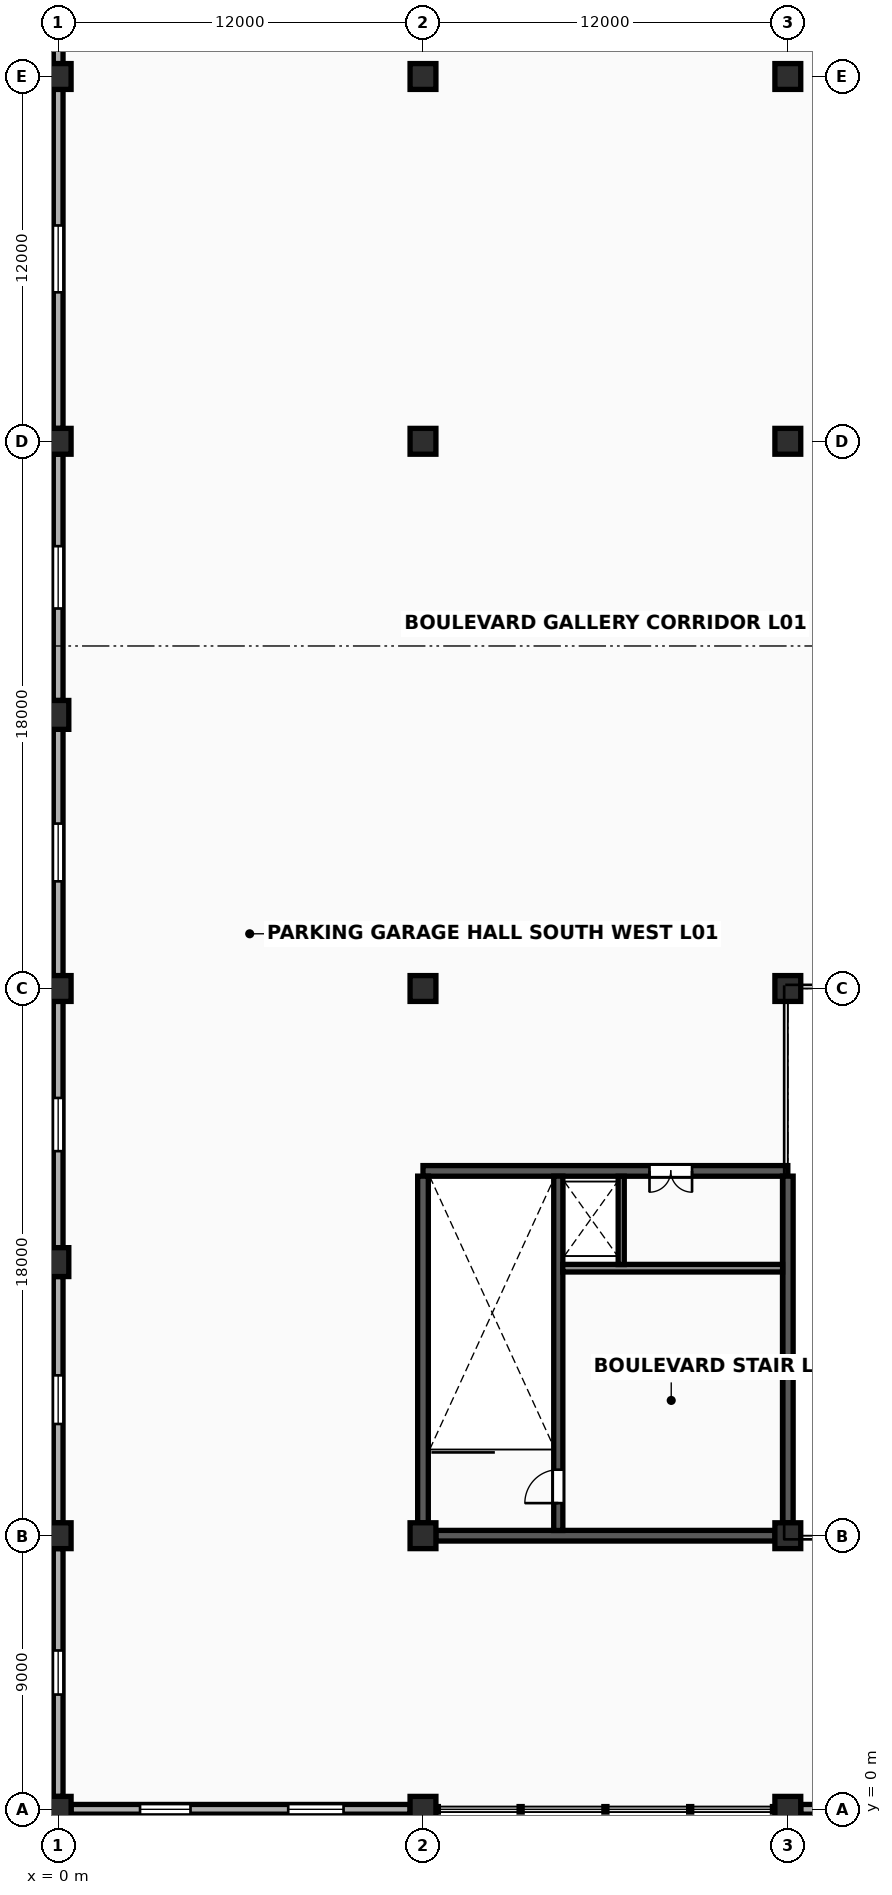
"""IFC4 building model, lengths in metres.
Left out: names, types, materials, properties, quantities, classifications, styles, units other than length and angle.
Written with IfcOpenShell. Run it as: python <this file> out.ifc"""

import sys

from ifc_helpers import new_model, si_unit, direction, frame, frame_2d, origin, origin_2d, place, context, subcontext, project, spatial, rectangle, circle, extrude, element, fill, save


model = new_model("IFC4")
c1 = context("Model", 3, precision=1e-05, world=origin(), true_north=direction((0.0, 1.0)))
c2 = subcontext(c1, "Body", "Model", "MODEL_VIEW")
j1 = project(units=[si_unit("LENGTHUNIT", "METRE"), si_unit("PLANEANGLEUNIT", "RADIAN")], contexts=[c1])
p1 = place(None, origin())
s1 = spatial("IfcSite", under=j1, at=p1, CompositionType="ELEMENT")
p2 = place(p1, origin())
s2 = spatial("IfcBuilding", under=s1, at=p2, CompositionType="ELEMENT")
p3 = place(p2, frame((0.0, 0.0, 5.4)))
s3 = spatial("IfcBuildingStorey", under=s2, at=p3, CompositionType="ELEMENT", Elevation=5.4)
for number, where, z_axis, x_axis in (
    (1, (0.0, 0.0, 0.0), (0.0, 0.0, 1.0), (1.0, 0.0, 0.0)),
    (2, (0.0, 9.0, 0.0), (0.0, 0.0, 1.0), (1.0, 0.0, 0.0)),
    (3, (0.0, 27.0, 0.0), (0.0, 0.0, 1.0), (1.0, 0.0, 0.0)),
    (4, (0.0, 45.0, 0.0), (0.0, 0.0, 1.0), (1.0, 0.0, 0.0)),
    (5, (0.0, 57.0, 0.0), (0.0, 0.0, 1.0), (1.0, 0.0, 0.0)),
):
    element("IfcColumn", number, at=place(p3, frame(where, z_axis=z_axis, x_axis=x_axis)), inside=s3, PredefinedType="COLUMN", context=c2, shape_type="SweptSolid", body=[
        extrude(rectangle(XDim=0.85, YDim=0.85, at=origin_2d()), origin(), (0.0, 0.0, 1.0), 4.2),
    ])
p4 = place(p3, frame((12.0, 0.0, 0.0), z_axis=(0.0, 0.0, 1.0), x_axis=(1.0, 0.0, 0.0)))
e6 = element("IfcColumn", 6, at=p4, inside=s3, PredefinedType="COLUMN", context=c2, shape_type="SweptSolid", body=[
    extrude(circle(Radius=0.425, at=origin_2d()), origin(), (0.0, 0.0, 1.0), 4.2),
])
for number, where, z_axis, x_axis in (
    (7, (12.0, 9.0, 0.0), (0.0, 0.0, 1.0), (1.0, 0.0, 0.0)),
    (8, (12.0, 27.0, 0.0), (0.0, 0.0, 1.0), (1.0, 0.0, 0.0)),
    (9, (12.0, 45.0, 0.0), (0.0, 0.0, 1.0), (1.0, 0.0, 0.0)),
    (10, (12.0, 57.0, 0.0), (0.0, 0.0, 1.0), (1.0, 0.0, 0.0)),
):
    element("IfcColumn", number, at=place(p3, frame(where, z_axis=z_axis, x_axis=x_axis)), inside=s3, PredefinedType="COLUMN", context=c2, shape_type="SweptSolid", body=[
        extrude(rectangle(XDim=0.85, YDim=0.85, at=origin_2d()), origin(), (0.0, 0.0, 1.0), 4.2),
    ])
p5 = place(p3, frame((24.0, 0.0, 0.0), z_axis=(0.0, 0.0, 1.0), x_axis=(1.0, 0.0, 0.0)))
e11 = element("IfcColumn", 11, at=p5, inside=s3, PredefinedType="COLUMN", context=c2, shape_type="SweptSolid", body=[
    extrude(circle(Radius=0.425, at=origin_2d()), origin(), (0.0, 0.0, 1.0), 4.2),
])
for number, where, z_axis, x_axis in (
    (12, (24.0, 9.0, 0.0), (0.0, 0.0, 1.0), (1.0, 0.0, 0.0)),
    (13, (24.0, 27.0, 0.0), (0.0, 0.0, 1.0), (1.0, 0.0, 0.0)),
    (14, (24.0, 45.0, 0.0), (0.0, 0.0, 1.0), (1.0, 0.0, 0.0)),
    (15, (24.0, 57.0, 0.0), (0.0, 0.0, 1.0), (1.0, 0.0, 0.0)),
):
    element("IfcColumn", number, at=place(p3, frame(where, z_axis=z_axis, x_axis=x_axis)), inside=s3, PredefinedType="COLUMN", context=c2, shape_type="SweptSolid", body=[
        extrude(rectangle(XDim=0.85, YDim=0.85, at=origin_2d()), origin(), (0.0, 0.0, 1.0), 4.2),
    ])
for number, where, z_axis, x_axis in (
    (16, (0.0, 18.0, 0.0), (0.0, 0.0, 1.0), (1.0, 0.0, 0.0)),
    (17, (0.0, 36.0, 0.0), (0.0, 0.0, 1.0), (1.0, 0.0, 0.0)),
):
    element("IfcColumn", number, at=place(p3, frame(where, z_axis=z_axis, x_axis=x_axis)), inside=s3, PredefinedType="PILASTER", context=c2, shape_type="SweptSolid", body=[
        extrude(rectangle(XDim=0.7, YDim=0.95, at=origin_2d()), origin(), (0.0, 0.0, 1.0), 4.2),
    ])
p6 = place(p3, frame((12.422, 9.0, 0.0), z_axis=(0.0, 0.0, 1.0), x_axis=(1.0, 0.0, 0.0)))
e18 = element("IfcWall", 18, at=p6, inside=s3, PredefinedType="SHEAR", context=c2, shape_type="SweptSolid", body=[
    extrude(rectangle(XDim=11.156, YDim=0.35, at=frame_2d((5.578, 0.0))), origin(), (0.0, 0.0, 1.0), 4.043),
])
p7 = place(p3, frame((12.0, 21.0, 0.0), z_axis=(0.0, 0.0, 1.0), x_axis=(1.0, 0.0, 0.0)))
e19 = element("IfcWall", 19, at=p7, inside=s3, PredefinedType="SHEAR", context=c2, shape_type="SweptSolid", body=[
    extrude(rectangle(XDim=12.0, YDim=0.35, at=frame_2d((6.0, 0.0))), origin(), (0.0, 0.0, 1.0), 4.043),
])
p8 = place(p7, frame((7.45, 0.0, 0.0)))
e20 = element("IfcOpeningElement", 20, at=p8, cuts=e19, PredefinedType="OPENING", context=c2, shape_type="SweptSolid", body=[
    extrude(rectangle(XDim=1.4, YDim=2.22, at=frame_2d((0.7, 1.11))), frame((0.0, 0.19, 0.0), z_axis=(0.0, -1.0, 0.0), x_axis=(1.0, 0.0, 0.0)), (0.0, 0.0, 1.0), 0.38),
])
for number, where, z_axis, x_axis in (
    (21, (12.0, 9.422, 0.0), (0.0, 0.0, 1.0), (0.0, 1.0, 0.0)),
    (22, (24.0, 9.422, 0.0), (0.0, 0.0, 1.0), (0.0, 1.0, 0.0)),
):
    element("IfcWall", number, at=place(p3, frame(where, z_axis=z_axis, x_axis=x_axis)), inside=s3, PredefinedType="SHEAR", context=c2, shape_type="SweptSolid", body=[
        extrude(rectangle(XDim=11.406, YDim=0.35, at=frame_2d((5.703, 0.0))), origin(), (0.0, 0.0, 1.0), 4.043),
    ])
p9 = place(p3, frame((16.45, 9.172, 0.0), z_axis=(0.0, 0.0, 1.0), x_axis=(0.0, 1.0, 0.0)))
e23 = element("IfcWall", 23, at=p9, inside=s3, PredefinedType="SHEAR", context=c2, shape_type="SweptSolid", body=[
    extrude(rectangle(XDim=11.656, YDim=0.3, at=frame_2d((5.828, 0.0))), origin(), (0.0, 0.0, 1.0), 4.043),
])
p10 = place(p9, frame((0.9, 0.0, 0.0)))
e24 = element("IfcOpeningElement", 24, at=p10, cuts=e23, PredefinedType="OPENING", context=c2, shape_type="SweptSolid", body=[
    extrude(rectangle(XDim=1.1, YDim=2.2, at=frame_2d((0.55, 1.1))), frame((0.0, 0.165, 0.0), z_axis=(0.0, -1.0, 0.0), x_axis=(1.0, 0.0, 0.0)), (0.0, 0.0, 1.0), 0.33),
])
p11 = place(p3, frame((16.597, 17.8, 0.0), z_axis=(0.0, 0.0, 1.0), x_axis=(1.0, 0.0, 0.0)))
e25 = element("IfcWall", 25, at=p11, inside=s3, PredefinedType="SOLIDWALL", context=c2, shape_type="SweptSolid", body=[
    extrude(rectangle(XDim=7.231, YDim=0.25, at=frame_2d((3.615, 0.0))), origin(), (0.0, 0.0, 1.0), 4.043),
])
p12 = place(p3, frame((18.52, 17.92, 0.0), z_axis=(0.0, 0.0, 1.0), x_axis=(0.0, 1.0, 0.0)))
e26 = element("IfcWall", 26, at=p12, inside=s3, PredefinedType="SOLIDWALL", context=c2, shape_type="SweptSolid", body=[
    extrude(rectangle(XDim=2.905, YDim=0.2, at=frame_2d((1.453, 0.0))), origin(), (0.0, 0.0, 1.0), 4.033),
])
p13 = place(p3, frame((0.423, 0.0, 0.0), z_axis=(0.0, 0.0, 1.0), x_axis=(1.0, 0.0, 0.0)))
e27 = element("IfcWall", 27, at=p13, inside=s3, PredefinedType="SOLIDWALL", context=c2, shape_type="SweptSolid", body=[
    extrude(rectangle(XDim=11.154, YDim=0.32, at=frame_2d((5.577, 0.0))), origin(), (0.0, 0.0, 1.0), 2.69),
])
p14 = place(p13, frame((2.27, 0.0, 0.55)))
e28 = element("IfcOpeningElement", 28, at=p14, cuts=e27, PredefinedType="OPENING", context=c2, shape_type="SweptSolid", body=[
    extrude(rectangle(XDim=1.66, YDim=1.58, at=frame_2d((0.83, 0.79))), frame((0.0, 0.175, 0.0), z_axis=(0.0, -1.0, 0.0), x_axis=(1.0, 0.0, 0.0)), (0.0, 0.0, 1.0), 0.35),
])
p15 = place(p13, frame((7.144, 0.0, 0.55)))
e29 = element("IfcOpeningElement", 29, at=p15, cuts=e27, PredefinedType="OPENING", context=c2, shape_type="SweptSolid", body=[
    extrude(rectangle(XDim=1.82, YDim=1.58, at=frame_2d((0.91, 0.79))), frame((0.0, 0.175, 0.0), z_axis=(0.0, -1.0, 0.0), x_axis=(1.0, 0.0, 0.0)), (0.0, 0.0, 1.0), 0.35),
])
p16 = place(p3, frame((24.423, 0.0, 0.0), z_axis=(0.0, 0.0, 1.0), x_axis=(1.0, 0.0, 0.0)))
e30 = element("IfcWall", 30, at=p16, inside=s3, PredefinedType="SOLIDWALL", context=c2, shape_type="SweptSolid", body=[
    extrude(rectangle(XDim=11.154, YDim=0.32, at=frame_2d((5.577, 0.0))), origin(), (0.0, 0.0, 1.0), 2.69),
])
p17 = place(p16, frame((2.11, 0.0, 0.55)))
e31 = element("IfcOpeningElement", 31, at=p17, cuts=e30, PredefinedType="OPENING", context=c2, shape_type="SweptSolid", body=[
    extrude(rectangle(XDim=1.98, YDim=1.58, at=frame_2d((0.99, 0.79))), frame((0.0, 0.175, 0.0), z_axis=(0.0, -1.0, 0.0), x_axis=(1.0, 0.0, 0.0)), (0.0, 0.0, 1.0), 0.35),
])
p18 = place(p16, frame((6.984, 0.0, 0.55)))
e32 = element("IfcOpeningElement", 32, at=p18, cuts=e30, PredefinedType="OPENING", context=c2, shape_type="SweptSolid", body=[
    extrude(rectangle(XDim=2.14, YDim=1.58, at=frame_2d((1.07, 0.79))), frame((0.0, 0.175, 0.0), z_axis=(0.0, -1.0, 0.0), x_axis=(1.0, 0.0, 0.0)), (0.0, 0.0, 1.0), 0.35),
])
p19 = place(p3, frame((0.0, 0.423, 0.0), z_axis=(0.0, 0.0, 1.0), x_axis=(0.0, 1.0, 0.0)))
e33 = element("IfcWall", 33, at=p19, inside=s3, PredefinedType="SOLIDWALL", context=c2, shape_type="SweptSolid", body=[
    extrude(rectangle(XDim=8.154, YDim=0.32, at=frame_2d((4.077, 0.0))), origin(), (0.0, 0.0, 1.0), 2.69),
])
p20 = place(p19, frame((3.352, 0.0, 0.55)))
e34 = element("IfcOpeningElement", 34, at=p20, cuts=e33, PredefinedType="OPENING", context=c2, shape_type="SweptSolid", body=[
    extrude(rectangle(XDim=1.45, YDim=1.25, at=frame_2d((0.725, 0.625))), frame((0.0, 0.175, 0.0), z_axis=(0.0, -1.0, 0.0), x_axis=(1.0, 0.0, 0.0)), (0.0, 0.0, 1.0), 0.35),
])
p21 = place(p3, frame((0.0, 9.423, 0.0), z_axis=(0.0, 0.0, 1.0), x_axis=(0.0, 1.0, 0.0)))
e35 = element("IfcWall", 35, at=p21, inside=s3, PredefinedType="SOLIDWALL", context=c2, shape_type="SweptSolid", body=[
    extrude(rectangle(XDim=8.104, YDim=0.32, at=frame_2d((4.052, 0.0))), origin(), (0.0, 0.0, 1.0), 2.69),
])
p22 = place(p21, frame((3.252, 0.0, 0.55)))
e36 = element("IfcOpeningElement", 36, at=p22, cuts=e35, PredefinedType="OPENING", context=c2, shape_type="SweptSolid", body=[
    extrude(rectangle(XDim=1.6, YDim=1.25, at=frame_2d((0.8, 0.625))), frame((0.0, 0.175, 0.0), z_axis=(0.0, -1.0, 0.0), x_axis=(1.0, 0.0, 0.0)), (0.0, 0.0, 1.0), 0.35),
])
p23 = place(p3, frame((0.0, 18.473, 0.0), z_axis=(0.0, 0.0, 1.0), x_axis=(0.0, 1.0, 0.0)))
e37 = element("IfcWall", 37, at=p23, inside=s3, PredefinedType="SOLIDWALL", context=c2, shape_type="SweptSolid", body=[
    extrude(rectangle(XDim=8.104, YDim=0.32, at=frame_2d((4.052, 0.0))), origin(), (0.0, 0.0, 1.0), 2.69),
])
p24 = place(p23, frame((3.177, 0.0, 0.55)))
e38 = element("IfcOpeningElement", 38, at=p24, cuts=e37, PredefinedType="OPENING", context=c2, shape_type="SweptSolid", body=[
    extrude(rectangle(XDim=1.75, YDim=1.25, at=frame_2d((0.875, 0.625))), frame((0.0, 0.175, 0.0), z_axis=(0.0, -1.0, 0.0), x_axis=(1.0, 0.0, 0.0)), (0.0, 0.0, 1.0), 0.35),
])
p25 = place(p3, frame((0.0, 27.423, 0.0), z_axis=(0.0, 0.0, 1.0), x_axis=(0.0, 1.0, 0.0)))
e39 = element("IfcWall", 39, at=p25, inside=s3, PredefinedType="SOLIDWALL", context=c2, shape_type="SweptSolid", body=[
    extrude(rectangle(XDim=8.104, YDim=0.32, at=frame_2d((4.052, 0.0))), origin(), (0.0, 0.0, 1.0), 2.69),
])
p26 = place(p25, frame((3.102, 0.0, 0.55)))
e40 = element("IfcOpeningElement", 40, at=p26, cuts=e39, PredefinedType="OPENING", context=c2, shape_type="SweptSolid", body=[
    extrude(rectangle(XDim=1.9, YDim=1.25, at=frame_2d((0.95, 0.625))), frame((0.0, 0.175, 0.0), z_axis=(0.0, -1.0, 0.0), x_axis=(1.0, 0.0, 0.0)), (0.0, 0.0, 1.0), 0.35),
])
p27 = place(p3, frame((0.0, 36.473, 0.0), z_axis=(0.0, 0.0, 1.0), x_axis=(0.0, 1.0, 0.0)))
e41 = element("IfcWall", 41, at=p27, inside=s3, PredefinedType="SOLIDWALL", context=c2, shape_type="SweptSolid", body=[
    extrude(rectangle(XDim=8.104, YDim=0.32, at=frame_2d((4.052, 0.0))), origin(), (0.0, 0.0, 1.0), 2.69),
])
p28 = place(p27, frame((3.027, 0.0, 0.55)))
e42 = element("IfcOpeningElement", 42, at=p28, cuts=e41, PredefinedType="OPENING", context=c2, shape_type="SweptSolid", body=[
    extrude(rectangle(XDim=2.05, YDim=1.25, at=frame_2d((1.025, 0.625))), frame((0.0, 0.175, 0.0), z_axis=(0.0, -1.0, 0.0), x_axis=(1.0, 0.0, 0.0)), (0.0, 0.0, 1.0), 0.35),
])
p29 = place(p3, frame((0.0, 45.423, 0.0), z_axis=(0.0, 0.0, 1.0), x_axis=(0.0, 1.0, 0.0)))
e43 = element("IfcWall", 43, at=p29, inside=s3, PredefinedType="SOLIDWALL", context=c2, shape_type="SweptSolid", body=[
    extrude(rectangle(XDim=11.154, YDim=0.32, at=frame_2d((5.577, 0.0))), origin(), (0.0, 0.0, 1.0), 2.69),
])
p30 = place(p29, frame((4.477, 0.0, 0.55)))
e44 = element("IfcOpeningElement", 44, at=p30, cuts=e43, PredefinedType="OPENING", context=c2, shape_type="SweptSolid", body=[
    extrude(rectangle(XDim=2.2, YDim=1.25, at=frame_2d((1.1, 0.625))), frame((0.0, 0.175, 0.0), z_axis=(0.0, -1.0, 0.0), x_axis=(1.0, 0.0, 0.0)), (0.0, 0.0, 1.0), 0.35),
])
p31 = place(p3, frame((0.0, 57.423, 0.0), z_axis=(0.0, 0.0, 1.0), x_axis=(0.0, 1.0, 0.0)))
e45 = element("IfcWall", 45, at=p31, inside=s3, PredefinedType="SOLIDWALL", context=c2, shape_type="SweptSolid", body=[
    extrude(rectangle(XDim=11.154, YDim=0.32, at=frame_2d((5.577, 0.0))), origin(), (0.0, 0.0, 1.0), 2.69),
])
p32 = place(p31, frame((4.402, 0.0, 0.55)))
e46 = element("IfcOpeningElement", 46, at=p32, cuts=e45, PredefinedType="OPENING", context=c2, shape_type="SweptSolid", body=[
    extrude(rectangle(XDim=2.35, YDim=1.25, at=frame_2d((1.175, 0.625))), frame((0.0, 0.175, 0.0), z_axis=(0.0, -1.0, 0.0), x_axis=(1.0, 0.0, 0.0)), (0.0, 0.0, 1.0), 0.35),
])
p33 = place(p14, origin())
e47 = element("IfcWindow", 47, at=p33, inside=s3, PartitioningType="SINGLE_PANEL", PredefinedType="WINDOW", context=c2, shape_type="SweptSolid", body=[
    extrude(rectangle(XDim=1.66, YDim=1.58, at=frame_2d((0.83, 0.79))), frame((0.0, 0.03, 0.0), z_axis=(0.0, -1.0, 0.0), x_axis=(1.0, 0.0, 0.0)), (0.0, 0.0, 1.0), 0.06),
])
fill(e28, e47)
p34 = place(p15, origin())
e48 = element("IfcWindow", 48, at=p34, inside=s3, PartitioningType="DOUBLE_PANEL_VERTICAL", PredefinedType="WINDOW", context=c2, shape_type="SweptSolid", body=[
    extrude(rectangle(XDim=1.82, YDim=1.58, at=frame_2d((0.91, 0.79))), frame((0.0, 0.03, 0.0), z_axis=(0.0, -1.0, 0.0), x_axis=(1.0, 0.0, 0.0)), (0.0, 0.0, 1.0), 0.06),
])
fill(e29, e48)
p35 = place(p20, origin())
e49 = element("IfcWindow", 49, at=p35, inside=s3, PartitioningType="SINGLE_PANEL", PredefinedType="WINDOW", context=c2, shape_type="SweptSolid", body=[
    extrude(rectangle(XDim=1.45, YDim=1.25, at=frame_2d((0.725, 0.625))), frame((0.0, 0.03, 0.0), z_axis=(0.0, -1.0, 0.0), x_axis=(1.0, 0.0, 0.0)), (0.0, 0.0, 1.0), 0.06),
])
fill(e34, e49)
p36 = place(p22, origin())
e50 = element("IfcWindow", 50, at=p36, inside=s3, PartitioningType="SINGLE_PANEL", PredefinedType="WINDOW", context=c2, shape_type="SweptSolid", body=[
    extrude(rectangle(XDim=1.6, YDim=1.25, at=frame_2d((0.8, 0.625))), frame((0.0, 0.03, 0.0), z_axis=(0.0, -1.0, 0.0), x_axis=(1.0, 0.0, 0.0)), (0.0, 0.0, 1.0), 0.06),
])
fill(e36, e50)
p37 = place(p24, origin())
e51 = element("IfcWindow", 51, at=p37, inside=s3, PartitioningType="SINGLE_PANEL", PredefinedType="WINDOW", context=c2, shape_type="SweptSolid", body=[
    extrude(rectangle(XDim=1.75, YDim=1.25, at=frame_2d((0.875, 0.625))), frame((0.0, 0.03, 0.0), z_axis=(0.0, -1.0, 0.0), x_axis=(1.0, 0.0, 0.0)), (0.0, 0.0, 1.0), 0.06),
])
fill(e38, e51)
p38 = place(p26, origin())
e52 = element("IfcWindow", 52, at=p38, inside=s3, PartitioningType="DOUBLE_PANEL_VERTICAL", PredefinedType="WINDOW", context=c2, shape_type="SweptSolid", body=[
    extrude(rectangle(XDim=1.9, YDim=1.25, at=frame_2d((0.95, 0.625))), frame((0.0, 0.03, 0.0), z_axis=(0.0, -1.0, 0.0), x_axis=(1.0, 0.0, 0.0)), (0.0, 0.0, 1.0), 0.06),
])
fill(e40, e52)
p39 = place(p28, origin())
e53 = element("IfcWindow", 53, at=p39, inside=s3, PartitioningType="DOUBLE_PANEL_VERTICAL", PredefinedType="WINDOW", context=c2, shape_type="SweptSolid", body=[
    extrude(rectangle(XDim=2.05, YDim=1.25, at=frame_2d((1.025, 0.625))), frame((0.0, 0.03, 0.0), z_axis=(0.0, -1.0, 0.0), x_axis=(1.0, 0.0, 0.0)), (0.0, 0.0, 1.0), 0.06),
])
fill(e42, e53)
p40 = place(p30, origin())
e54 = element("IfcWindow", 54, at=p40, inside=s3, PartitioningType="DOUBLE_PANEL_VERTICAL", PredefinedType="WINDOW", context=c2, shape_type="SweptSolid", body=[
    extrude(rectangle(XDim=2.2, YDim=1.25, at=frame_2d((1.1, 0.625))), frame((0.0, 0.03, 0.0), z_axis=(0.0, -1.0, 0.0), x_axis=(1.0, 0.0, 0.0)), (0.0, 0.0, 1.0), 0.06),
])
fill(e44, e54)
p41 = place(p10, origin())
e55 = element("IfcDoor", 55, at=p41, inside=s3, OperationType="SINGLE_SWING_LEFT", PredefinedType="DOOR", context=c2, shape_type="SweptSolid", body=[
    extrude(rectangle(XDim=1.1, YDim=2.2, at=frame_2d((0.55, 1.1))), frame((0.0, 0.025, 0.0), z_axis=(0.0, -1.0, 0.0), x_axis=(1.0, 0.0, 0.0)), (0.0, 0.0, 1.0), 0.05),
])
fill(e24, e55)
p42 = place(p8, origin())
e56 = element("IfcDoor", 56, at=p42, inside=s3, OperationType="DOUBLE_DOOR_SINGLE_SWING", PredefinedType="DOOR", context=c2, shape_type="SweptSolid", body=[
    extrude(rectangle(XDim=1.4, YDim=2.22, at=frame_2d((0.7, 1.11))), frame((0.0, 0.025, 0.0), z_axis=(0.0, -1.0, 0.0), x_axis=(1.0, 0.0, 0.0)), (0.0, 0.0, 1.0), 0.05),
])
fill(e20, e56)
save(model, sys.argv[1])
